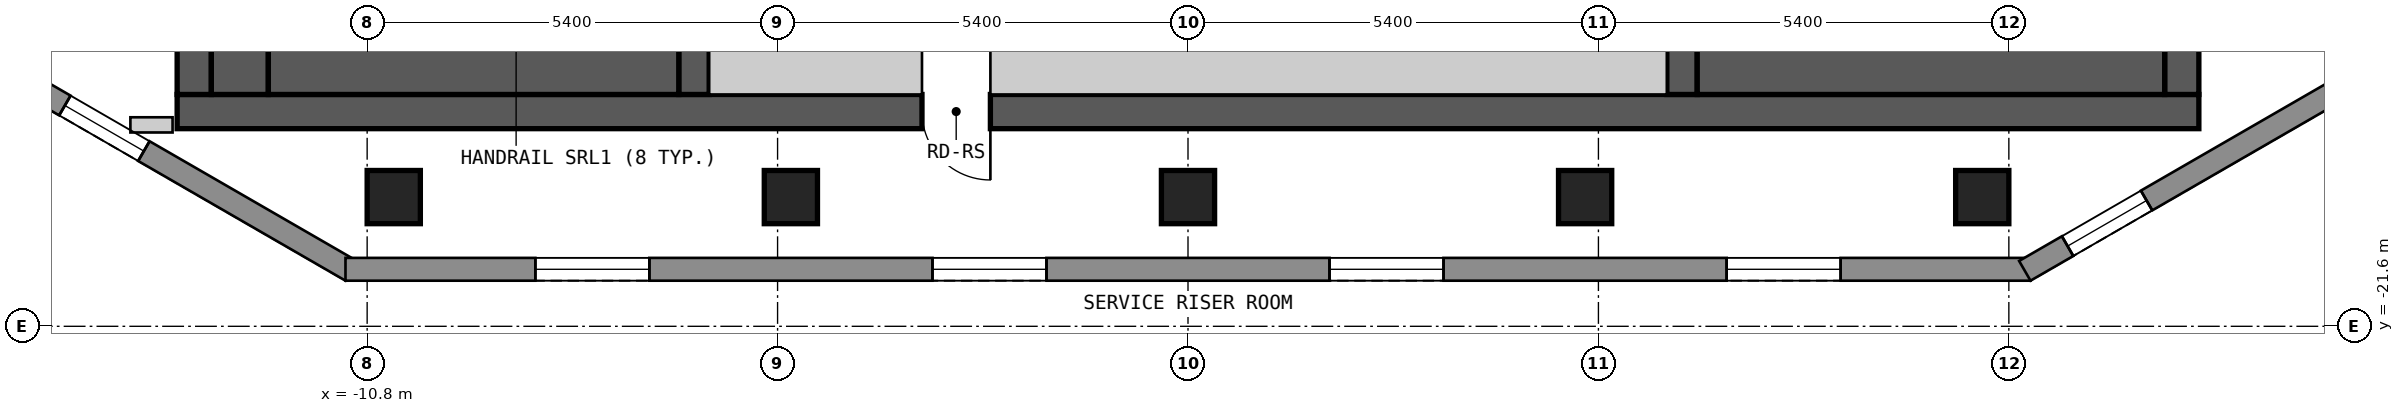
"""IFC4 building model, lengths in metres.
Left out: names, types, materials, properties, quantities, classifications, styles, units other than length and angle.
Written with IfcOpenShell. Run it as: python <this file> out.ifc"""

import sys

from ifc_helpers import new_model, si_unit, direction, frame, frame_2d, origin, origin_2d, place, context, subcontext, project, spatial, polyline, rectangle, outline, extrude, element, fill, save


model = new_model("IFC4")
c1 = context("Model", 3, precision=1e-05, world=origin(), true_north=direction((0.0, 1.0)))
c2 = subcontext(c1, "Body", "Model", "MODEL_VIEW")
j1 = project(units=[si_unit("LENGTHUNIT", "METRE"), si_unit("PLANEANGLEUNIT", "RADIAN")], contexts=[c1])
p1 = place(None, origin())
s1 = spatial("IfcSite", under=j1, at=p1, CompositionType="ELEMENT")
p2 = place(p1, origin())
s2 = spatial("IfcBuilding", under=s1, at=p2, CompositionType="ELEMENT")
p3 = place(p2, frame((0.0, 0.0, 229.8)))
s3 = spatial("IfcBuildingStorey", under=s2, at=p3, CompositionType="ELEMENT", Elevation=229.8)
for number, where, z_axis, x_axis in (
    (1, (-10.45, -19.9, 0.0), (0.0, 0.0, 1.0), (1.0, 0.0, 0.0)),
    (2, (-5.225, -19.9, 0.0), (0.0, 0.0, 1.0), (1.0, 0.0, 0.0)),
    (3, (0.0, -19.9, 0.0), (0.0, 0.0, 1.0), (1.0, 0.0, 0.0)),
    (4, (5.225, -19.9, 0.0), (0.0, 0.0, 1.0), (1.0, 0.0, 0.0)),
    (5, (10.45, -19.9, 0.0), (0.0, 0.0, 1.0), (1.0, 0.0, 0.0)),
):
    element("IfcColumn", number, at=place(p3, frame(where, z_axis=z_axis, x_axis=x_axis)), inside=s3, PredefinedType="COLUMN", context=c2, shape_type="SweptSolid", body=[
        extrude(rectangle(XDim=0.7, YDim=0.7, at=origin_2d()), origin(), (0.0, 0.0, 1.0), 3.0),
    ])
p4 = place(p3, frame((-13.3, -18.775, 0.0), z_axis=(0.0, 0.0, 1.0), x_axis=(1.0, 0.0, 0.0)))
e6 = element("IfcWall", 6, at=p4, inside=s3, PredefinedType="SHEAR", context=c2, shape_type="SweptSolid", body=[
    extrude(rectangle(XDim=26.6, YDim=0.45, at=frame_2d((13.3, 0.0))), origin(), (0.0, 0.0, 1.0), 2.7),
])
p5 = place(p4, frame((9.8, 0.0, 0.0)))
e7 = element("IfcOpeningElement", 7, at=p5, cuts=e6, PredefinedType="OPENING", context=c2, shape_type="SweptSolid", body=[
    extrude(rectangle(XDim=0.9, YDim=2.1, at=frame_2d((0.45, 1.05))), frame((0.0, 0.235, 0.0), z_axis=(0.0, -1.0, 0.0), x_axis=(1.0, 0.0, 0.0)), (0.0, 0.0, 1.0), 0.47),
])
p6 = place(p3, frame((-13.075, -18.55, 0.0), z_axis=(0.0, 0.0, 1.0), x_axis=(0.0, 1.0, 0.0)))
e8 = element("IfcWall", 8, at=p6, inside=s3, PredefinedType="SHEAR", context=c2, shape_type="SweptSolid", body=[
    extrude(rectangle(XDim=13.1, YDim=0.45, at=frame_2d((6.55, 0.0))), origin(), (0.0, 0.0, 1.0), 2.7),
])
p7 = place(p6, frame((4.35, 0.0, 0.0)))
e9 = element("IfcOpeningElement", 9, at=p7, cuts=e8, PredefinedType="OPENING", context=c2, shape_type="SweptSolid", body=[
    extrude(rectangle(XDim=1.2, YDim=2.1, at=frame_2d((0.6, 1.05))), frame((0.0, 0.235, 0.0), z_axis=(0.0, -1.0, 0.0), x_axis=(1.0, 0.0, 0.0)), (0.0, 0.0, 1.0), 0.47),
])
p8 = place(p3, frame((13.075, -18.55, 0.0), z_axis=(0.0, 0.0, 1.0), x_axis=(0.0, 1.0, 0.0)))
e10 = element("IfcWall", 10, at=p8, inside=s3, PredefinedType="SHEAR", context=c2, shape_type="SweptSolid", body=[
    extrude(rectangle(XDim=13.1, YDim=0.45, at=frame_2d((6.55, 0.0))), origin(), (0.0, 0.0, 1.0), 2.7),
])
for number, where, z_axis, x_axis in (
    (11, (-6.5, -18.55, 0.0), (0.0, 0.0, 1.0), (0.0, 1.0, 0.0)),
    (12, (6.5, -18.55, 0.0), (0.0, 0.0, 1.0), (0.0, 1.0, 0.0)),
):
    element("IfcWall", number, at=place(p3, frame(where, z_axis=z_axis, x_axis=x_axis)), inside=s3, PredefinedType="SHEAR", context=c2, shape_type="SweptSolid", body=[
        extrude(rectangle(XDim=3.7, YDim=0.4, at=frame_2d((1.85, 0.0))), origin(), (0.0, 0.0, 1.0), 2.7),
    ])
p9 = place(p3, frame((-15.34, -18.37, 0.0), z_axis=(0.0, 0.0, 1.0), x_axis=(0.866022959057, -0.500004234368, 0.0)))
e13 = element("IfcWall", 13, at=p9, inside=s3, PredefinedType="SOLIDWALL", context=c2, shape_type="SweptSolid", body=[
    extrude(outline(polyline([(0.0, -0.15), (5.0, -0.15), (4.92, 0.15), (0.08, 0.15), (0.0, -0.15)])), origin(), (0.0, 0.0, 1.0), 2.7),
])
p10 = place(p9, frame((0.65, 0.0, 0.15)))
e14 = element("IfcOpeningElement", 14, at=p10, cuts=e13, PredefinedType="OPENING", context=c2, shape_type="SweptSolid", body=[
    extrude(rectangle(XDim=1.2, YDim=2.1, at=frame_2d((0.6, 1.05))), frame((0.0, 0.16, 0.0), z_axis=(0.0, -1.0, 0.0), x_axis=(1.0, 0.0, 0.0)), (0.0, 0.0, 1.0), 0.32),
])
p11 = place(p3, frame((-11.085, -20.85, 0.0), z_axis=(0.0, 0.0, 1.0), x_axis=(1.0, 0.0, 0.0)))
e15 = element("IfcWall", 15, at=p11, inside=s3, PredefinedType="SOLIDWALL", context=c2, shape_type="SweptSolid", body=[
    extrude(outline(polyline([(0.0, -0.15), (22.17, -0.15), (22.09, 0.15), (0.08, 0.15), (0.0, -0.15)])), origin(), (0.0, 0.0, 1.0), 2.7),
])
p12 = place(p11, frame((2.498, 0.0, 0.15)))
e16 = element("IfcOpeningElement", 16, at=p12, cuts=e15, PredefinedType="OPENING", context=c2, shape_type="SweptSolid", body=[
    extrude(rectangle(XDim=1.5, YDim=2.1, at=frame_2d((0.75, 1.05))), frame((0.0, 0.16, 0.0), z_axis=(0.0, -1.0, 0.0), x_axis=(1.0, 0.0, 0.0)), (0.0, 0.0, 1.0), 0.32),
])
p13 = place(p11, frame((7.723, 0.0, 0.15)))
e17 = element("IfcOpeningElement", 17, at=p13, cuts=e15, PredefinedType="OPENING", context=c2, shape_type="SweptSolid", body=[
    extrude(rectangle(XDim=1.5, YDim=2.1, at=frame_2d((0.75, 1.05))), frame((0.0, 0.16, 0.0), z_axis=(0.0, -1.0, 0.0), x_axis=(1.0, 0.0, 0.0)), (0.0, 0.0, 1.0), 0.32),
])
p14 = place(p11, frame((12.947, 0.0, 0.15)))
e18 = element("IfcOpeningElement", 18, at=p14, cuts=e15, PredefinedType="OPENING", context=c2, shape_type="SweptSolid", body=[
    extrude(rectangle(XDim=1.5, YDim=2.1, at=frame_2d((0.75, 1.05))), frame((0.0, 0.16, 0.0), z_axis=(0.0, -1.0, 0.0), x_axis=(1.0, 0.0, 0.0)), (0.0, 0.0, 1.0), 0.32),
])
p15 = place(p11, frame((18.172, 0.0, 0.15)))
e19 = element("IfcOpeningElement", 19, at=p15, cuts=e15, PredefinedType="OPENING", context=c2, shape_type="SweptSolid", body=[
    extrude(rectangle(XDim=1.5, YDim=2.1, at=frame_2d((0.75, 1.05))), frame((0.0, 0.16, 0.0), z_axis=(0.0, -1.0, 0.0), x_axis=(1.0, 0.0, 0.0)), (0.0, 0.0, 1.0), 0.32),
])
p16 = place(p3, frame((11.01, -20.87, 0.0), z_axis=(0.0, 0.0, 1.0), x_axis=(0.866022959057, 0.500004234368, 0.0)))
e20 = element("IfcWall", 20, at=p16, inside=s3, PredefinedType="SOLIDWALL", context=c2, shape_type="SweptSolid", body=[
    extrude(outline(polyline([(0.0, -0.15), (5.0, -0.15), (4.92, 0.15), (0.08, 0.15), (0.0, -0.15)])), origin(), (0.0, 0.0, 1.0), 2.7),
])
p17 = place(p16, frame((0.65, 0.0, 0.15)))
e21 = element("IfcOpeningElement", 21, at=p17, cuts=e20, PredefinedType="OPENING", context=c2, shape_type="SweptSolid", body=[
    extrude(rectangle(XDim=1.2, YDim=2.1, at=frame_2d((0.6, 1.05))), frame((0.0, 0.16, 0.0), z_axis=(0.0, -1.0, 0.0), x_axis=(1.0, 0.0, 0.0)), (0.0, 0.0, 1.0), 0.32),
])
p18 = place(p3, frame((-13.915, -18.95, 0.0), z_axis=(0.0, 0.0, 1.0), x_axis=(1.0, 0.0, 0.0)))
e22 = element("IfcWall", 22, at=p18, inside=s3, PredefinedType="PARTITIONING", context=c2, shape_type="SweptSolid", body=[
    extrude(rectangle(XDim=0.555, YDim=0.2, at=frame_2d((0.277, 0.0))), origin(), (0.0, 0.0, 1.0), 2.7),
])
p19 = place(p3, frame((-12.475, -18.55, 0.0), z_axis=(0.0, 0.0, 1.0), x_axis=(0.0, 1.0, 0.0)))
e23 = element("IfcWall", 23, at=p19, inside=s3, PredefinedType="SOLIDWALL", context=c2, shape_type="SweptSolid", body=[
    extrude(rectangle(XDim=3.7, YDim=0.75, at=frame_2d((1.85, 0.0))), origin(), (0.0, 0.0, 1.0), 2.7),
])
p20 = place(p3, frame((-12.1, -18.175, 0.0), z_axis=(0.0, 0.0, 1.0), x_axis=(1.0, 0.0, 0.0)))
e24 = element("IfcWall", 24, at=p20, inside=s3, PredefinedType="SOLIDWALL", context=c2, shape_type="SweptSolid", body=[
    extrude(rectangle(XDim=5.4, YDim=0.75, at=frame_2d((2.7, 0.0))), origin(), (0.0, 0.0, 1.0), 2.7),
])
p21 = place(p3, frame((-6.3, -18.175, 0.0), z_axis=(0.0, 0.0, 1.0), x_axis=(1.0, 0.0, 0.0)))
e25 = element("IfcWall", 25, at=p21, inside=s3, PredefinedType="PARTITIONING", context=c2, shape_type="SweptSolid", body=[
    extrude(rectangle(XDim=2.8, YDim=0.75, at=frame_2d((1.4, 0.0))), origin(), (0.0, 0.0, 1.0), 2.7),
])
p22 = place(p3, frame((-2.6, -18.175, 0.0), z_axis=(0.0, 0.0, 1.0), x_axis=(1.0, 0.0, 0.0)))
e26 = element("IfcWall", 26, at=p22, inside=s3, PredefinedType="PARTITIONING", context=c2, shape_type="SweptSolid", body=[
    extrude(rectangle(XDim=8.9, YDim=0.75, at=frame_2d((4.45, 0.0))), origin(), (0.0, 0.0, 1.0), 2.7),
])
p23 = place(p3, frame((6.7, -18.075, 0.0), z_axis=(0.0, 0.0, 1.0), x_axis=(1.0, 0.0, 0.0)))
e27 = element("IfcWall", 27, at=p23, inside=s3, PredefinedType="SOLIDWALL", context=c2, shape_type="SweptSolid", body=[
    extrude(rectangle(XDim=6.15, YDim=0.95, at=frame_2d((3.075, 0.0))), origin(), (0.0, 0.0, 1.0), 2.7),
])
p24 = place(p10, origin())
e28 = element("IfcWindow", 28, at=p24, inside=s3, PartitioningType="SINGLE_PANEL", PredefinedType="WINDOW", context=c2, shape_type="SweptSolid", body=[
    extrude(rectangle(XDim=1.2, YDim=2.1, at=frame_2d((0.6, 1.05))), frame((0.0, 0.03, 0.0), z_axis=(0.0, -1.0, 0.0), x_axis=(1.0, 0.0, 0.0)), (0.0, 0.0, 1.0), 0.06),
])
fill(e14, e28)
p25 = place(p12, origin())
e29 = element("IfcWindow", 29, at=p25, inside=s3, PartitioningType="SINGLE_PANEL", PredefinedType="WINDOW", context=c2, shape_type="SweptSolid", body=[
    extrude(rectangle(XDim=1.5, YDim=2.1, at=frame_2d((0.75, 1.05))), frame((0.0, 0.03, 0.0), z_axis=(0.0, -1.0, 0.0), x_axis=(1.0, 0.0, 0.0)), (0.0, 0.0, 1.0), 0.06),
])
fill(e16, e29)
p26 = place(p13, origin())
e30 = element("IfcWindow", 30, at=p26, inside=s3, PartitioningType="SINGLE_PANEL", PredefinedType="WINDOW", context=c2, shape_type="SweptSolid", body=[
    extrude(rectangle(XDim=1.5, YDim=2.1, at=frame_2d((0.75, 1.05))), frame((0.0, 0.03, 0.0), z_axis=(0.0, -1.0, 0.0), x_axis=(1.0, 0.0, 0.0)), (0.0, 0.0, 1.0), 0.06),
])
fill(e17, e30)
p27 = place(p14, origin())
e31 = element("IfcWindow", 31, at=p27, inside=s3, PartitioningType="SINGLE_PANEL", PredefinedType="WINDOW", context=c2, shape_type="SweptSolid", body=[
    extrude(rectangle(XDim=1.5, YDim=2.1, at=frame_2d((0.75, 1.05))), frame((0.0, 0.03, 0.0), z_axis=(0.0, -1.0, 0.0), x_axis=(1.0, 0.0, 0.0)), (0.0, 0.0, 1.0), 0.06),
])
fill(e18, e31)
p28 = place(p15, origin())
e32 = element("IfcWindow", 32, at=p28, inside=s3, PartitioningType="SINGLE_PANEL", PredefinedType="WINDOW", context=c2, shape_type="SweptSolid", body=[
    extrude(rectangle(XDim=1.5, YDim=2.1, at=frame_2d((0.75, 1.05))), frame((0.0, 0.03, 0.0), z_axis=(0.0, -1.0, 0.0), x_axis=(1.0, 0.0, 0.0)), (0.0, 0.0, 1.0), 0.06),
])
fill(e19, e32)
p29 = place(p17, origin())
e33 = element("IfcWindow", 33, at=p29, inside=s3, PartitioningType="SINGLE_PANEL", PredefinedType="WINDOW", context=c2, shape_type="SweptSolid", body=[
    extrude(rectangle(XDim=1.2, YDim=2.1, at=frame_2d((0.6, 1.05))), frame((0.0, 0.03, 0.0), z_axis=(0.0, -1.0, 0.0), x_axis=(1.0, 0.0, 0.0)), (0.0, 0.0, 1.0), 0.06),
])
fill(e21, e33)
p30 = place(p5, origin())
e34 = element("IfcDoor", 34, at=p30, inside=s3, OperationType="SINGLE_SWING_RIGHT", PredefinedType="DOOR", context=c2, shape_type="SweptSolid", body=[
    extrude(rectangle(XDim=0.9, YDim=2.1, at=frame_2d((0.45, 1.05))), frame((0.0, 0.025, 0.0), z_axis=(0.0, -1.0, 0.0), x_axis=(1.0, 0.0, 0.0)), (0.0, 0.0, 1.0), 0.05),
])
fill(e7, e34)
save(model, sys.argv[1])
